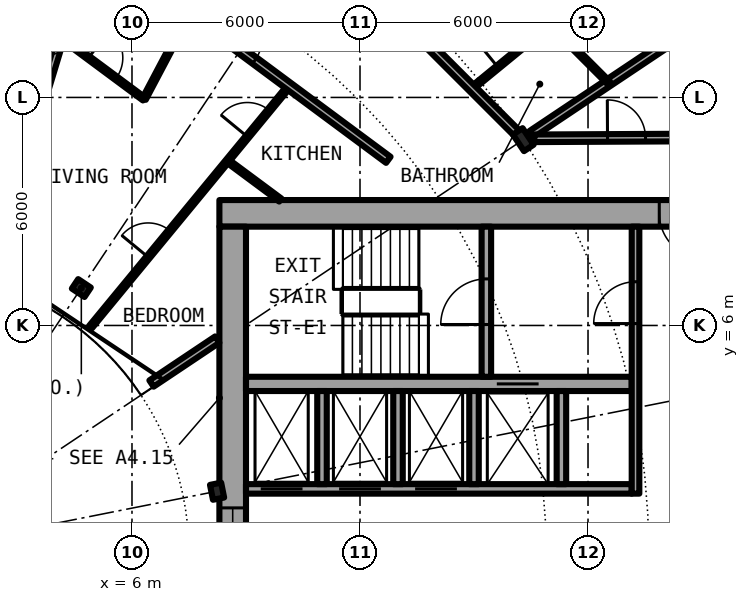
"""IFC4 building model, lengths in metres.
Left out: names, types, materials, properties, quantities, classifications, styles, units other than length and angle.
Written with IfcOpenShell. Run it as: python <this file> out.ifc"""

import sys

from ifc_helpers import new_model, si_unit, direction, frame, frame_2d, origin, origin_2d, place, context, subcontext, project, spatial, rectangle, i_section, extrude, element, fill, save


model = new_model("IFC4")
c1 = context("Model", 3, precision=1e-05, world=origin(), true_north=direction((0.0, 1.0)))
c2 = subcontext(c1, "Body", "Model", "MODEL_VIEW")
j1 = project(units=[si_unit("LENGTHUNIT", "METRE"), si_unit("PLANEANGLEUNIT", "RADIAN")], contexts=[c1])
p1 = place(None, origin())
s1 = spatial("IfcSite", under=j1, at=p1, CompositionType="ELEMENT")
p2 = place(p1, origin())
s2 = spatial("IfcBuilding", under=s1, at=p2, CompositionType="ELEMENT")
p3 = place(p2, frame((0.0, 0.0, 88.0)))
s3 = spatial("IfcBuildingStorey", under=s2, at=p3, CompositionType="ELEMENT", Elevation=88.0)
p4 = place(p3, frame((16.297, 10.889, 0.0), z_axis=(0.0, 0.0, 1.0), x_axis=(0.831469612303, 0.55557023302, 0.0)))
e1 = element("IfcColumn", 1, at=p4, inside=s3, PredefinedType="COLUMN", context=c2, shape_type="SweptSolid", body=[
    extrude(i_section(OverallWidth=0.306, OverallDepth=0.524, WebThickness=0.021, FlangeThickness=0.04, FilletRadius=0.027, at=origin_2d()), origin(), (0.0, 0.0, 1.0), 3.05),
])
for number, where, z_axis, x_axis in (
    (2, (8.239, 1.639, 0.0), (0.0, 0.0, 1.0), (0.981, 0.195, 0.0)),
    (3, (4.667, 6.984, 0.0), (0.0, 0.0, 1.0), (0.556, 0.831, 0.0)),
):
    element("IfcColumn", number, at=place(p3, frame(where, z_axis=z_axis, x_axis=x_axis)), inside=s3, PredefinedType="COLUMN", context=c2, shape_type="SweptSolid", body=[
        extrude(i_section(OverallWidth=0.3, OverallDepth=0.4, WebThickness=0.013, FlangeThickness=0.024, FilletRadius=0.027, at=origin_2d()), origin(), (0.0, 0.0, 1.0), 3.05),
    ])
p5 = place(p3, frame((22.3, 8.95, 0.0), z_axis=(0.0, 0.0, 1.0), x_axis=(-1.0, 0.0, 0.0)))
e4 = element("IfcWall", 4, at=p5, inside=s3, PredefinedType="SHEAR", context=c2, shape_type="SweptSolid", body=[
    extrude(rectangle(XDim=14.0, YDim=0.7, at=frame_2d((7.0, 0.0))), origin(), (0.0, 0.0, 1.0), 3.05),
])
p6 = place(p5, frame((1.225, 0.0, 0.0)))
e5 = element("IfcOpeningElement", 5, at=p6, cuts=e4, PredefinedType="OPENING", context=c2, shape_type="SweptSolid", body=[
    extrude(rectangle(XDim=1.2, YDim=2.3, at=frame_2d((0.6, 1.15))), frame((0.0, 0.36, 0.0), z_axis=(0.0, -1.0, 0.0), x_axis=(1.0, 0.0, 0.0)), (0.0, 0.0, 1.0), 0.72),
])
p7 = place(p3, frame((8.65, -8.6, 0.0), z_axis=(0.0, 0.0, 1.0), x_axis=(0.0, 1.0, 0.0)))
e6 = element("IfcWall", 6, at=p7, inside=s3, PredefinedType="SHEAR", context=c2, shape_type="SweptSolid", body=[
    extrude(rectangle(XDim=17.2, YDim=0.7, at=frame_2d((8.6, 0.0))), origin(), (0.0, 0.0, 1.0), 3.05),
])
p8 = place(p7, frame((7.4, 0.0, 0.1)))
e7 = element("IfcOpeningElement", 7, at=p8, cuts=e6, PredefinedType="OPENING", context=c2, shape_type="SweptSolid", body=[
    extrude(rectangle(XDim=2.4, YDim=2.2, at=frame_2d((1.2, 1.1))), frame((0.0, 0.36, 0.0), z_axis=(0.0, -1.0, 0.0), x_axis=(1.0, 0.0, 0.0)), (0.0, 0.0, 1.0), 0.72),
])
p9 = place(p3, frame((9.0, 1.7, 0.0), z_axis=(0.0, 0.0, 1.0), x_axis=(1.0, 0.0, 0.0)))
e8 = element("IfcWall", 8, at=p9, inside=s3, PredefinedType="SHEAR", context=c2, shape_type="SweptSolid", body=[
    extrude(rectangle(XDim=10.15, YDim=0.25, at=frame_2d((5.075, 0.0))), origin(), (0.0, 0.0, 1.0), 3.05),
])
p10 = place(p9, frame((0.387, 0.0, 0.0)))
e9 = element("IfcOpeningElement", 9, at=p10, cuts=e8, PredefinedType="OPENING", context=c2, shape_type="SweptSolid", body=[
    extrude(rectangle(XDim=1.1, YDim=2.3, at=frame_2d((0.55, 1.15))), frame((0.0, 0.135, 0.0), z_axis=(0.0, -1.0, 0.0), x_axis=(1.0, 0.0, 0.0)), (0.0, 0.0, 1.0), 0.27),
])
p11 = place(p9, frame((2.45, 0.0, 0.0)))
e10 = element("IfcOpeningElement", 10, at=p11, cuts=e8, PredefinedType="OPENING", context=c2, shape_type="SweptSolid", body=[
    extrude(rectangle(XDim=1.1, YDim=2.3, at=frame_2d((0.55, 1.15))), frame((0.0, 0.135, 0.0), z_axis=(0.0, -1.0, 0.0), x_axis=(1.0, 0.0, 0.0)), (0.0, 0.0, 1.0), 0.27),
])
p12 = place(p9, frame((4.45, 0.0, 0.0)))
e11 = element("IfcOpeningElement", 11, at=p12, cuts=e8, PredefinedType="OPENING", context=c2, shape_type="SweptSolid", body=[
    extrude(rectangle(XDim=1.1, YDim=2.3, at=frame_2d((0.55, 1.15))), frame((0.0, 0.135, 0.0), z_axis=(0.0, -1.0, 0.0), x_axis=(1.0, 0.0, 0.0)), (0.0, 0.0, 1.0), 0.27),
])
p13 = place(p3, frame((9.0, 4.462, 0.0), z_axis=(0.0, 0.0, 1.0), x_axis=(1.0, 0.0, 0.0)))
e12 = element("IfcWall", 12, at=p13, inside=s3, PredefinedType="SHEAR", context=c2, shape_type="SweptSolid", body=[
    extrude(rectangle(XDim=10.15, YDim=0.375, at=frame_2d((5.075, 0.0))), origin(), (0.0, 0.0, 1.0), 3.05),
])
p14 = place(p13, frame((6.6, 0.0, 0.0)))
e13 = element("IfcOpeningElement", 13, at=p14, cuts=e12, PredefinedType="OPENING", context=c2, shape_type="SweptSolid", body=[
    extrude(rectangle(XDim=1.1, YDim=2.3, at=frame_2d((0.55, 1.15))), frame((0.0, 0.198, 0.0), z_axis=(0.0, -1.0, 0.0), x_axis=(1.0, 0.0, 0.0)), (0.0, 0.0, 1.0), 0.395),
])
p15 = place(p3, frame((15.325, 4.65, 0.0), z_axis=(0.0, 0.0, 1.0), x_axis=(0.0, 1.0, 0.0)))
e14 = element("IfcWall", 14, at=p15, inside=s3, PredefinedType="SHEAR", context=c2, shape_type="SweptSolid", body=[
    extrude(rectangle(XDim=3.95, YDim=0.25, at=frame_2d((1.975, 0.0))), origin(), (0.0, 0.0, 1.0), 3.05),
])
p16 = place(p15, frame((1.375, 0.0, 0.0)))
e15 = element("IfcOpeningElement", 15, at=p16, cuts=e14, PredefinedType="OPENING", context=c2, shape_type="SweptSolid", body=[
    extrude(rectangle(XDim=1.2, YDim=2.3, at=frame_2d((0.6, 1.15))), frame((0.0, 0.135, 0.0), z_axis=(0.0, -1.0, 0.0), x_axis=(1.0, 0.0, 0.0)), (0.0, 0.0, 1.0), 0.27),
])
for number, where, z_axis, x_axis in (
    (16, (15.0, 1.825, 0.0), (0.0, 0.0, 1.0), (0.0, 1.0, 0.0)),
    (17, (17.3, 1.825, 0.0), (0.0, 0.0, 1.0), (0.0, 1.0, 0.0)),
):
    element("IfcWall", number, at=place(p3, frame(where, z_axis=z_axis, x_axis=x_axis)), inside=s3, PredefinedType="SOLIDWALL", context=c2, shape_type="SweptSolid", body=[
        extrude(rectangle(XDim=2.45, YDim=0.25, at=frame_2d((1.225, 0.0))), origin(), (0.0, 0.0, 1.0), 2.7),
    ])
p17 = place(p3, frame((19.25, 1.575, 0.0), z_axis=(0.0, 0.0, 1.0), x_axis=(0.0, 1.0, 0.0)))
e18 = element("IfcWall", 18, at=p17, inside=s3, PredefinedType="SOLIDWALL", context=c2, shape_type="SweptSolid", body=[
    extrude(rectangle(XDim=7.025, YDim=0.2, at=frame_2d((3.513, 0.0))), origin(), (0.0, 0.0, 1.0), 2.7),
])
p18 = place(p17, frame((4.475, 0.0, 0.0)))
e19 = element("IfcOpeningElement", 19, at=p18, cuts=e18, PredefinedType="OPENING", context=c2, shape_type="SweptSolid", body=[
    extrude(rectangle(XDim=1.1, YDim=2.3, at=frame_2d((0.55, 1.15))), frame((0.0, 0.11, 0.0), z_axis=(0.0, -1.0, 0.0), x_axis=(1.0, 0.0, 0.0)), (0.0, 0.0, 1.0), 0.22),
])
for number, where, z_axis, x_axis in (
    (20, (11.0, 1.825, 0.0), (0.0, 0.0, 1.0), (0.0, 1.0, 0.0)),
    (21, (13.0, 1.825, 0.0), (0.0, 0.0, 1.0), (0.0, 1.0, 0.0)),
):
    element("IfcWall", number, at=place(p3, frame(where, z_axis=z_axis, x_axis=x_axis)), inside=s3, PredefinedType="SOLIDWALL", context=c2, shape_type="SweptSolid", body=[
        extrude(rectangle(XDim=2.45, YDim=0.25, at=frame_2d((1.225, 0.0))), origin(), (0.0, 0.0, 1.0), 2.7),
    ])
p19 = place(p3, frame((2.243, 7.387, 0.0), z_axis=(0.0, 0.0, 1.0), x_axis=(0.290196345171, 0.956967126525, 0.0)))
e22 = element("IfcWall", 22, at=p19, inside=s3, PredefinedType="PARTITIONING", context=c2, shape_type="SweptSolid", body=[
    extrude(rectangle(XDim=9.18, YDim=0.2, at=frame_2d((4.59, 0.0))), origin(), (0.0, 0.0, 1.0), 2.7),
])
p20 = place(p3, frame((4.909, 5.958, 0.0), z_axis=(0.0, 0.0, 1.0), x_axis=(0.635976043025, 0.771708800454, 0.0)))
e23 = element("IfcWall", 23, at=p20, inside=s3, PredefinedType="PARTITIONING", context=c2, shape_type="SweptSolid", body=[
    extrude(rectangle(XDim=8.213, YDim=0.1, at=frame_2d((4.106, 0.0))), origin(), (0.0, 0.0, 1.0), 2.7),
])
p21 = place(p20, frame((6.49, 0.0, 0.0)))
e24 = element("IfcOpeningElement", 24, at=p21, cuts=e23, PredefinedType="OPENING", context=c2, shape_type="SweptSolid", body=[
    extrude(rectangle(XDim=0.9, YDim=2.3, at=frame_2d((0.45, 1.15))), frame((0.0, 0.06, 0.0), z_axis=(0.0, -1.0, 0.0), x_axis=(1.0, 0.0, 0.0)), (0.0, 0.0, 1.0), 0.12),
])
p22 = place(p20, frame((2.384, 0.0, 0.0)))
e25 = element("IfcOpeningElement", 25, at=p22, cuts=e23, PredefinedType="OPENING", context=c2, shape_type="SweptSolid", body=[
    extrude(rectangle(XDim=0.9, YDim=2.3, at=frame_2d((0.45, 1.15))), frame((0.0, 0.06, 0.0), z_axis=(0.0, -1.0, 0.0), x_axis=(1.0, 0.0, 0.0)), (0.0, 0.0, 1.0), 0.12),
])
p23 = place(p3, frame((6.318, 11.96, 0.0), z_axis=(0.0, 0.0, 1.0), x_axis=(0.467001992543, 0.884256263173, 0.0)))
e26 = element("IfcWall", 26, at=p23, inside=s3, PredefinedType="PARTITIONING", context=c2, shape_type="SweptSolid", body=[
    extrude(rectangle(XDim=2.572, YDim=0.1, at=frame_2d((1.286, 0.0))), origin(), (0.0, 0.0, 1.0), 2.7),
])
p24 = place(p3, frame((14.945, 12.241, 0.0), z_axis=(0.0, 0.0, 1.0), x_axis=(0.77367517848, 0.633582447834, 0.0)))
e27 = element("IfcWall", 27, at=p24, inside=s3, PredefinedType="PARTITIONING", context=c2, shape_type="SweptSolid", body=[
    extrude(rectangle(XDim=2.661, YDim=0.1, at=frame_2d((1.331, 0.0))), origin(), (0.0, 0.0, 1.0), 2.7),
])
p25 = place(p24, frame((0.881, 0.0, 0.0)))
e28 = element("IfcOpeningElement", 28, at=p25, cuts=e27, PredefinedType="OPENING", context=c2, shape_type="SweptSolid", body=[
    extrude(rectangle(XDim=0.9, YDim=2.3, at=frame_2d((0.45, 1.15))), frame((0.0, 0.06, 0.0), z_axis=(0.0, -1.0, 0.0), x_axis=(1.0, 0.0, 0.0)), (0.0, 0.0, 1.0), 0.12),
])
p26 = place(p3, frame((16.515, 11.034, 0.0), z_axis=(0.0, 0.0, 1.0), x_axis=(0.831382022135, 0.555701298605, 0.0)))
e29 = element("IfcWall", 29, at=p26, inside=s3, PredefinedType="PARTITIONING", context=c2, shape_type="SweptSolid", body=[
    extrude(rectangle(XDim=7.313, YDim=0.2, at=frame_2d((3.657, 0.0))), origin(), (0.0, 0.0, 1.0), 2.7),
])
p27 = place(p3, frame((6.513, 4.472, 0.0), z_axis=(0.0, 0.0, 1.0), x_axis=(0.831382204863, 0.555701025225, 0.0)))
e30 = element("IfcWall", 30, at=p27, inside=s3, PredefinedType="PARTITIONING", context=c2, shape_type="SweptSolid", body=[
    extrude(rectangle(XDim=2.082, YDim=0.2, at=frame_2d((1.041, 0.0))), origin(), (0.0, 0.0, 1.0), 2.7),
])
p28 = place(p3, frame((16.588, 10.925, 0.0), z_axis=(0.0, 0.0, 1.0), x_axis=(0.999988019025, 0.004895079807, 0.0)))
e31 = element("IfcWall", 31, at=p28, inside=s3, PredefinedType="PARTITIONING", context=c2, shape_type="SweptSolid", body=[
    extrude(rectangle(XDim=5.087, YDim=0.2, at=frame_2d((2.543, 0.0))), origin(), (0.0, 0.0, 1.0), 2.7),
])
p29 = place(p28, frame((1.925, 0.0, 0.0)))
e32 = element("IfcOpeningElement", 32, at=p29, cuts=e31, PredefinedType="OPENING", context=c2, shape_type="SweptSolid", body=[
    extrude(rectangle(XDim=1.0, YDim=2.3, at=frame_2d((0.5, 1.15))), frame((0.0, 0.11, 0.0), z_axis=(0.0, -1.0, 0.0), x_axis=(1.0, 0.0, 0.0)), (0.0, 0.0, 1.0), 0.22),
])
p30 = place(p3, frame((4.122, 13.589, 0.0), z_axis=(0.0, 0.0, 1.0), x_axis=(0.803128348509, -0.595806055542, 0.0)))
e33 = element("IfcWall", 33, at=p30, inside=s3, PredefinedType="PARTITIONING", context=c2, shape_type="SweptSolid", body=[
    extrude(rectangle(XDim=2.734, YDim=0.1, at=frame_2d((1.367, 0.0))), origin(), (0.0, 0.0, 1.0), 2.7),
])
p31 = place(p30, frame((0.917, 0.0, 0.0)))
e34 = element("IfcOpeningElement", 34, at=p31, cuts=e33, PredefinedType="OPENING", context=c2, shape_type="SweptSolid", body=[
    extrude(rectangle(XDim=0.9, YDim=2.3, at=frame_2d((0.45, 1.15))), frame((0.0, 0.06, 0.0), z_axis=(0.0, -1.0, 0.0), x_axis=(1.0, 0.0, 0.0)), (0.0, 0.0, 1.0), 0.12),
])
p32 = place(p3, frame((8.512, 10.332, 0.0), z_axis=(0.0, 0.0, 1.0), x_axis=(0.803135014325, -0.595797070121, 0.0)))
e35 = element("IfcWall", 35, at=p32, inside=s3, PredefinedType="PARTITIONING", context=c2, shape_type="SweptSolid", body=[
    extrude(rectangle(XDim=1.732, YDim=0.1, at=frame_2d((0.866, 0.0))), origin(), (0.0, 0.0, 1.0), 2.7),
])
p33 = place(p3, frame((4.906, 16.172, 0.0), z_axis=(0.0, 0.0, 1.0), x_axis=(0.803191461888, -0.595720971219, 0.0)))
e36 = element("IfcWall", 36, at=p33, inside=s3, PredefinedType="PARTITIONING", context=c2, shape_type="SweptSolid", body=[
    extrude(rectangle(XDim=9.76, YDim=0.2, at=frame_2d((4.88, 0.0))), origin(), (0.0, 0.0, 1.0), 2.7),
])
p34 = place(p33, frame((4.38, 0.0, 0.0)))
e37 = element("IfcOpeningElement", 37, at=p34, cuts=e36, PredefinedType="OPENING", context=c2, shape_type="SweptSolid", body=[
    extrude(rectangle(XDim=1.0, YDim=2.3, at=frame_2d((0.5, 1.15))), frame((0.0, 0.11, 0.0), z_axis=(0.0, -1.0, 0.0), x_axis=(1.0, 0.0, 0.0)), (0.0, 0.0, 1.0), 0.22),
])
p35 = place(p3, frame((11.0, 16.186, 0.0), z_axis=(0.0, 0.0, 1.0), x_axis=(0.707106781187, -0.707106781187, 0.0)))
e38 = element("IfcWall", 38, at=p35, inside=s3, PredefinedType="PARTITIONING", context=c2, shape_type="SweptSolid", body=[
    extrude(rectangle(XDim=7.334, YDim=0.2, at=frame_2d((3.667, 0.0))), origin(), (0.0, 0.0, 1.0), 2.38),
])
p36 = place(p35, frame((2.211, 0.0, 0.0)))
e39 = element("IfcOpeningElement", 39, at=p36, cuts=e38, PredefinedType="OPENING", context=c2, shape_type="SweptSolid", body=[
    extrude(rectangle(XDim=1.0, YDim=2.3, at=frame_2d((0.5, 1.15))), frame((0.0, 0.11, 0.0), z_axis=(0.0, -1.0, 0.0), x_axis=(1.0, 0.0, 0.0)), (0.0, 0.0, 1.0), 0.22),
])
p37 = place(p3, frame((17.006, 13.924, 0.0), z_axis=(0.0, 0.0, 1.0), x_axis=(0.706826194425, -0.707387256653, 0.0)))
e40 = element("IfcWall", 40, at=p37, inside=s3, PredefinedType="PARTITIONING", context=c2, shape_type="SweptSolid", body=[
    extrude(rectangle(XDim=2.176, YDim=0.1, at=frame_2d((1.088, 0.0))), origin(), (0.0, 0.0, 1.0), 2.7),
])
p38 = place(p10, origin())
e41 = element("IfcDoor", 41, at=p38, inside=s3, OperationType="DOUBLE_DOOR_SLIDING", PredefinedType="DOOR", context=c2, shape_type="SweptSolid", body=[
    extrude(rectangle(XDim=1.1, YDim=2.3, at=frame_2d((0.55, 1.15))), frame((0.0, 0.025, 0.0), z_axis=(0.0, -1.0, 0.0), x_axis=(1.0, 0.0, 0.0)), (0.0, 0.0, 1.0), 0.05),
])
fill(e9, e41)
p39 = place(p11, origin())
e42 = element("IfcDoor", 42, at=p39, inside=s3, OperationType="DOUBLE_DOOR_SLIDING", PredefinedType="DOOR", context=c2, shape_type="SweptSolid", body=[
    extrude(rectangle(XDim=1.1, YDim=2.3, at=frame_2d((0.55, 1.15))), frame((0.0, 0.025, 0.0), z_axis=(0.0, -1.0, 0.0), x_axis=(1.0, 0.0, 0.0)), (0.0, 0.0, 1.0), 0.05),
])
fill(e10, e42)
p40 = place(p12, origin())
e43 = element("IfcDoor", 43, at=p40, inside=s3, OperationType="DOUBLE_DOOR_SLIDING", PredefinedType="DOOR", context=c2, shape_type="SweptSolid", body=[
    extrude(rectangle(XDim=1.1, YDim=2.3, at=frame_2d((0.55, 1.15))), frame((0.0, 0.025, 0.0), z_axis=(0.0, -1.0, 0.0), x_axis=(1.0, 0.0, 0.0)), (0.0, 0.0, 1.0), 0.05),
])
fill(e11, e43)
p41 = place(p14, origin())
e44 = element("IfcDoor", 44, at=p41, inside=s3, OperationType="DOUBLE_DOOR_SLIDING", PredefinedType="DOOR", context=c2, shape_type="SweptSolid", body=[
    extrude(rectangle(XDim=1.1, YDim=2.3, at=frame_2d((0.55, 1.15))), frame((0.0, 0.025, 0.0), z_axis=(0.0, -1.0, 0.0), x_axis=(1.0, 0.0, 0.0)), (0.0, 0.0, 1.0), 0.05),
])
fill(e13, e44)
p42 = place(p16, origin())
e45 = element("IfcDoor", 45, at=p42, inside=s3, OperationType="SINGLE_SWING_LEFT", PredefinedType="DOOR", context=c2, shape_type="SweptSolid", body=[
    extrude(rectangle(XDim=1.2, YDim=2.3, at=frame_2d((0.6, 1.15))), frame((0.0, 0.025, 0.0), z_axis=(0.0, -1.0, 0.0), x_axis=(1.0, 0.0, 0.0)), (0.0, 0.0, 1.0), 0.05),
])
fill(e15, e45)
p43 = place(p18, origin())
e46 = element("IfcDoor", 46, at=p43, inside=s3, OperationType="SINGLE_SWING_LEFT", PredefinedType="DOOR", context=c2, shape_type="SweptSolid", body=[
    extrude(rectangle(XDim=1.1, YDim=2.3, at=frame_2d((0.55, 1.15))), frame((0.0, 0.025, 0.0), z_axis=(0.0, -1.0, 0.0), x_axis=(1.0, 0.0, 0.0)), (0.0, 0.0, 1.0), 0.05),
])
fill(e19, e46)
p44 = place(p6, origin())
e47 = element("IfcDoor", 47, at=p44, inside=s3, OperationType="SINGLE_SWING_RIGHT", PredefinedType="DOOR", context=c2, shape_type="SweptSolid", body=[
    extrude(rectangle(XDim=1.2, YDim=2.3, at=frame_2d((0.6, 1.15))), frame((0.0, 0.025, 0.0), z_axis=(0.0, -1.0, 0.0), x_axis=(1.0, 0.0, 0.0)), (0.0, 0.0, 1.0), 0.05),
])
fill(e5, e47)
p45 = place(p8, origin())
e48 = element("IfcWindow", 48, at=p45, inside=s3, PartitioningType="SINGLE_PANEL", PredefinedType="WINDOW", context=c2, shape_type="SweptSolid", body=[
    extrude(rectangle(XDim=2.4, YDim=2.2, at=frame_2d((1.2, 1.1))), frame((0.0, 0.03, 0.0), z_axis=(0.0, -1.0, 0.0), x_axis=(1.0, 0.0, 0.0)), (0.0, 0.0, 1.0), 0.06),
])
fill(e7, e48)
p46 = place(p25, origin())
e49 = element("IfcDoor", 49, at=p46, inside=s3, OperationType="SINGLE_SWING_LEFT", PredefinedType="DOOR", context=c2, shape_type="SweptSolid", body=[
    extrude(rectangle(XDim=0.9, YDim=2.3, at=frame_2d((0.45, 1.15))), frame((0.0, 0.025, 0.0), z_axis=(0.0, -1.0, 0.0), x_axis=(1.0, 0.0, 0.0)), (0.0, 0.0, 1.0), 0.05),
])
fill(e28, e49)
p47 = place(p34, origin())
e50 = element("IfcDoor", 50, at=p47, inside=s3, OperationType="SINGLE_SWING_LEFT", PredefinedType="DOOR", context=c2, shape_type="SweptSolid", body=[
    extrude(rectangle(XDim=1.0, YDim=2.3, at=frame_2d((0.5, 1.15))), frame((0.0, 0.025, 0.0), z_axis=(0.0, -1.0, 0.0), x_axis=(1.0, 0.0, 0.0)), (0.0, 0.0, 1.0), 0.05),
])
fill(e37, e50)
p48 = place(p31, origin())
e51 = element("IfcDoor", 51, at=p48, inside=s3, OperationType="SINGLE_SWING_LEFT", PredefinedType="DOOR", context=c2, shape_type="SweptSolid", body=[
    extrude(rectangle(XDim=0.9, YDim=2.3, at=frame_2d((0.45, 1.15))), frame((0.0, 0.025, 0.0), z_axis=(0.0, -1.0, 0.0), x_axis=(1.0, 0.0, 0.0)), (0.0, 0.0, 1.0), 0.05),
])
fill(e34, e51)
p49 = place(p21, origin())
e52 = element("IfcDoor", 52, at=p49, inside=s3, OperationType="SINGLE_SWING_RIGHT", PredefinedType="DOOR", context=c2, shape_type="SweptSolid", body=[
    extrude(rectangle(XDim=0.9, YDim=2.3, at=frame_2d((0.45, 1.15))), frame((0.0, 0.025, 0.0), z_axis=(0.0, -1.0, 0.0), x_axis=(1.0, 0.0, 0.0)), (0.0, 0.0, 1.0), 0.05),
])
fill(e24, e52)
p50 = place(p22, origin())
e53 = element("IfcDoor", 53, at=p50, inside=s3, OperationType="SINGLE_SWING_LEFT", PredefinedType="DOOR", context=c2, shape_type="SweptSolid", body=[
    extrude(rectangle(XDim=0.9, YDim=2.3, at=frame_2d((0.45, 1.15))), frame((0.0, 0.025, 0.0), z_axis=(0.0, -1.0, 0.0), x_axis=(1.0, 0.0, 0.0)), (0.0, 0.0, 1.0), 0.05),
])
fill(e25, e53)
p51 = place(p29, origin())
e54 = element("IfcDoor", 54, at=p51, inside=s3, OperationType="SINGLE_SWING_LEFT", PredefinedType="DOOR", context=c2, shape_type="SweptSolid", body=[
    extrude(rectangle(XDim=1.0, YDim=2.3, at=frame_2d((0.5, 1.15))), frame((0.0, 0.025, 0.0), z_axis=(0.0, -1.0, 0.0), x_axis=(1.0, 0.0, 0.0)), (0.0, 0.0, 1.0), 0.05),
])
fill(e32, e54)
save(model, sys.argv[1])
